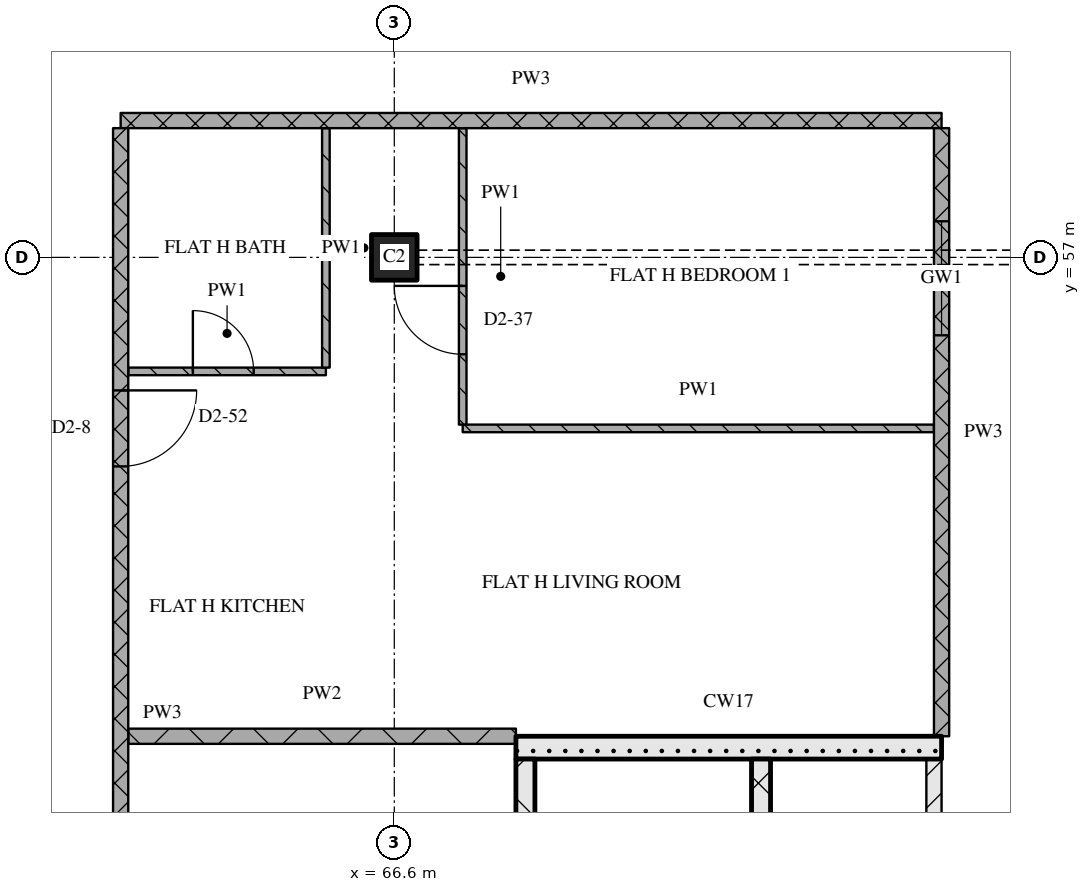
"""IFC4 building model, lengths in metres.
Left out: names, types, materials, properties, quantities, classifications, styles, units other than length and angle.
Written with IfcOpenShell. Run it as: python <this file> out.ifc"""

import sys

from ifc_helpers import new_model, si_unit, direction, frame, frame_2d, origin, origin_2d, place, context, subcontext, project, spatial, rectangle, extrude, element, fill, save


model = new_model("IFC4")
c1 = context("Model", 3, precision=1e-05, world=origin(), true_north=direction((0.0, 1.0)))
c2 = subcontext(c1, "Body", "Model", "MODEL_VIEW")
j1 = project(units=[si_unit("LENGTHUNIT", "METRE"), si_unit("PLANEANGLEUNIT", "RADIAN")], contexts=[c1])
p1 = place(None, origin())
s1 = spatial("IfcSite", under=j1, at=p1, CompositionType="ELEMENT")
p2 = place(p1, origin())
s2 = spatial("IfcBuilding", under=s1, at=p2, CompositionType="ELEMENT")
p3 = place(p2, frame((0.0, 0.0, 216.3)))
s3 = spatial("IfcBuildingStorey", under=s2, at=p3, CompositionType="ELEMENT", Elevation=216.3)
p4 = place(p3, frame((66.6, 57.0, 0.0), z_axis=(0.0, 0.0, 1.0), x_axis=(1.0, 0.0, 0.0)))
e1 = element("IfcColumn", 1, at=p4, inside=s3, PredefinedType="COLUMN", context=c2, shape_type="SweptSolid", body=[
    extrude(rectangle(XDim=0.6, YDim=0.6, at=origin_2d()), origin(), (0.0, 0.0, 1.0), 3.6),
])
p5 = place(p3, frame((68.325, 43.5, 0.0), z_axis=(0.0, 0.0, 1.0), x_axis=(0.0, 1.0, 0.0)))
e2 = element("IfcWall", 2, at=p5, inside=s3, PredefinedType="SOLIDWALL", context=c2, shape_type="SweptSolid", body=[
    extrude(rectangle(XDim=6.9, YDim=0.25, at=frame_2d((3.45, 0.0))), origin(), (0.0, 0.0, 1.0), 3.32),
])
p6 = place(p3, frame((71.425, 43.5, 0.0), z_axis=(0.0, 0.0, 1.0), x_axis=(0.0, 1.0, 0.0)))
e3 = element("IfcWall", 3, at=p6, inside=s3, PredefinedType="SOLIDWALL", context=c2, shape_type="SweptSolid", body=[
    extrude(rectangle(XDim=6.9, YDim=0.25, at=frame_2d((3.45, 0.0))), origin(), (0.0, 0.0, 1.0), 3.32),
])
p7 = place(p6, frame((0.2, 0.0, 0.0)))
e4 = element("IfcOpeningElement", 4, at=p7, cuts=e3, PredefinedType="OPENING", context=c2, shape_type="SweptSolid", body=[
    extrude(rectangle(XDim=1.0, YDim=2.1, at=frame_2d((0.5, 1.05))), frame((0.0, 0.135, 0.0), z_axis=(0.0, -1.0, 0.0), x_axis=(1.0, 0.0, 0.0)), (0.0, 0.0, 1.0), 0.27),
])
p8 = place(p3, frame((73.7, 43.5, 0.0), z_axis=(0.0, 0.0, 1.0), x_axis=(0.0, 1.0, 0.0)))
e5 = element("IfcWall", 5, at=p8, inside=s3, PredefinedType="PARTITIONING", context=c2, shape_type="SweptSolid", body=[
    extrude(rectangle(XDim=6.9, YDim=0.2, at=frame_2d((3.45, 0.0))), origin(), (0.0, 0.0, 1.0), 3.32),
])
p9 = place(p8, frame((1.0, 0.0, 0.0)))
e6 = element("IfcOpeningElement", 6, at=p9, cuts=e5, PredefinedType="OPENING", context=c2, shape_type="SweptSolid", body=[
    extrude(rectangle(XDim=1.0, YDim=2.1, at=frame_2d((0.5, 1.05))), frame((0.0, 0.11, 0.0), z_axis=(0.0, -1.0, 0.0), x_axis=(1.0, 0.0, 0.0)), (0.0, 0.0, 1.0), 0.22),
])
p10 = place(p3, frame((68.2, 50.55, 0.0), z_axis=(0.0, 0.0, 1.0), x_axis=(1.0, 0.0, 0.0)))
e7 = element("IfcWall", 7, at=p10, inside=s3, PredefinedType="SOLIDWALL", context=c2, shape_type="SweptSolid", body=[
    extrude(rectangle(XDim=5.6, YDim=0.3, at=frame_2d((2.8, 0.0))), origin(), (0.0, 0.0, 1.0), 3.32),
])
p11 = place(p3, frame((63.1, 50.7, 0.0), z_axis=(0.0, 0.0, 1.0), x_axis=(1.0, 0.0, 0.0)))
e8 = element("IfcWall", 8, at=p11, inside=s3, PredefinedType="PARTITIONING", context=c2, shape_type="SweptSolid", body=[
    extrude(rectangle(XDim=5.1, YDim=0.2, at=frame_2d((2.55, 0.0))), origin(), (0.0, 0.0, 1.0), 3.32),
])
p12 = place(p3, frame((67.5, 54.75, 0.0), z_axis=(0.0, 0.0, 1.0), x_axis=(1.0, 0.0, 0.0)))
e9 = element("IfcWall", 9, at=p12, inside=s3, PredefinedType="PARTITIONING", context=c2, shape_type="SweptSolid", body=[
    extrude(rectangle(XDim=6.2, YDim=0.1, at=frame_2d((3.1, 0.0))), origin(), (0.0, 0.0, 1.0), 3.32),
])
p13 = place(p3, frame((63.1, 55.5, 0.0), z_axis=(0.0, 0.0, 1.0), x_axis=(1.0, 0.0, 0.0)))
e10 = element("IfcWall", 10, at=p13, inside=s3, PredefinedType="PARTITIONING", context=c2, shape_type="SweptSolid", body=[
    extrude(rectangle(XDim=2.6, YDim=0.1, at=frame_2d((1.3, 0.0))), origin(), (0.0, 0.0, 1.0), 3.32),
])
p14 = place(p13, frame((0.85, 0.0, 0.0)))
e11 = element("IfcOpeningElement", 11, at=p14, cuts=e10, PredefinedType="OPENING", context=c2, shape_type="SweptSolid", body=[
    extrude(rectangle(XDim=0.8, YDim=2.1, at=frame_2d((0.4, 1.05))), frame((0.0, 0.06, 0.0), z_axis=(0.0, -1.0, 0.0), x_axis=(1.0, 0.0, 0.0)), (0.0, 0.0, 1.0), 0.12),
])
p15 = place(p3, frame((63.0, 58.8, 0.0), z_axis=(0.0, 0.0, 1.0), x_axis=(1.0, 0.0, 0.0)))
e12 = element("IfcWall", 12, at=p15, inside=s3, PredefinedType="PARTITIONING", context=c2, shape_type="SweptSolid", body=[
    extrude(rectangle(XDim=10.8, YDim=0.2, at=frame_2d((5.4, 0.0))), origin(), (0.0, 0.0, 1.0), 3.32),
])
p16 = place(p3, frame((63.0, 58.7, 0.0), z_axis=(0.0, 0.0, 1.0), x_axis=(0.0, -1.0, 0.0)))
e13 = element("IfcWall", 13, at=p16, inside=s3, PredefinedType="PARTITIONING", context=c2, shape_type="SweptSolid", body=[
    extrude(rectangle(XDim=15.4, YDim=0.2, at=frame_2d((7.7, 0.0))), origin(), (0.0, 0.0, 1.0), 3.32),
])
p17 = place(p16, frame((3.45, 0.0, 0.0)))
e14 = element("IfcOpeningElement", 14, at=p17, cuts=e13, PredefinedType="OPENING", context=c2, shape_type="SweptSolid", body=[
    extrude(rectangle(XDim=1.0, YDim=2.1, at=frame_2d((0.5, 1.05))), frame((0.0, 0.11, 0.0), z_axis=(0.0, -1.0, 0.0), x_axis=(1.0, 0.0, 0.0)), (0.0, 0.0, 1.0), 0.22),
])
p18 = place(p16, frame((11.25, 0.0, 0.0)))
e15 = element("IfcOpeningElement", 15, at=p18, cuts=e13, PredefinedType="OPENING", context=c2, shape_type="SweptSolid", body=[
    extrude(rectangle(XDim=0.9, YDim=2.1, at=frame_2d((0.45, 1.05))), frame((0.0, 0.11, 0.0), z_axis=(0.0, -1.0, 0.0), x_axis=(1.0, 0.0, 0.0)), (0.0, 0.0, 1.0), 0.22),
])
p19 = place(p3, frame((65.7, 58.7, 0.0), z_axis=(0.0, 0.0, 1.0), x_axis=(0.0, -1.0, 0.0)))
e16 = element("IfcWall", 16, at=p19, inside=s3, PredefinedType="PARTITIONING", context=c2, shape_type="SweptSolid", body=[
    extrude(rectangle(XDim=3.15, YDim=0.1, at=frame_2d((1.575, 0.0))), origin(), (0.0, 0.0, 1.0), 3.32),
])
p20 = place(p3, frame((67.5, 58.7, 0.0), z_axis=(0.0, 0.0, 1.0), x_axis=(0.0, -1.0, 0.0)))
e17 = element("IfcWall", 17, at=p20, inside=s3, PredefinedType="PARTITIONING", context=c2, shape_type="SweptSolid", body=[
    extrude(rectangle(XDim=3.9, YDim=0.1, at=frame_2d((1.95, 0.0))), origin(), (0.0, 0.0, 1.0), 3.32),
])
p21 = place(p20, frame((2.075, 0.0, 0.0)))
e18 = element("IfcOpeningElement", 18, at=p21, cuts=e17, PredefinedType="OPENING", context=c2, shape_type="SweptSolid", body=[
    extrude(rectangle(XDim=0.9, YDim=2.1, at=frame_2d((0.45, 1.05))), frame((0.0, 0.06, 0.0), z_axis=(0.0, -1.0, 0.0), x_axis=(1.0, 0.0, 0.0)), (0.0, 0.0, 1.0), 0.12),
])
p22 = place(p3, frame((73.8, 58.7, 0.0), z_axis=(0.0, 0.0, 1.0), x_axis=(0.0, -1.0, 0.0)))
e19 = element("IfcWall", 19, at=p22, inside=s3, PredefinedType="PARTITIONING", context=c2, shape_type="SweptSolid", body=[
    extrude(rectangle(XDim=8.0, YDim=0.2, at=frame_2d((4.0, 0.0))), origin(), (0.0, 0.0, 1.0), 3.32),
])
p23 = place(p22, frame((1.225, 0.0, 0.9)))
e20 = element("IfcOpeningElement", 20, at=p23, cuts=e19, PredefinedType="OPENING", context=c2, shape_type="SweptSolid", body=[
    extrude(rectangle(XDim=1.5, YDim=1.5, at=frame_2d((0.75, 0.75))), frame((0.0, 0.11, 0.0), z_axis=(0.0, -1.0, 0.0), x_axis=(1.0, 0.0, 0.0)), (0.0, 0.0, 1.0), 0.22),
])
p24 = place(p14, origin())
e21 = element("IfcDoor", 21, at=p24, inside=s3, OperationType="SINGLE_SWING_LEFT", PredefinedType="DOOR", context=c2, shape_type="SweptSolid", body=[
    extrude(rectangle(XDim=0.8, YDim=2.1, at=frame_2d((0.4, 1.05))), frame((0.0, 0.025, 0.0), z_axis=(0.0, -1.0, 0.0), x_axis=(1.0, 0.0, 0.0)), (0.0, 0.0, 1.0), 0.05),
])
fill(e11, e21)
p25 = place(p17, origin())
e22 = element("IfcDoor", 22, at=p25, inside=s3, OperationType="SINGLE_SWING_LEFT", PredefinedType="DOOR", context=c2, shape_type="SweptSolid", body=[
    extrude(rectangle(XDim=1.0, YDim=2.1, at=frame_2d((0.5, 1.05))), frame((0.0, 0.025, 0.0), z_axis=(0.0, -1.0, 0.0), x_axis=(1.0, 0.0, 0.0)), (0.0, 0.0, 1.0), 0.05),
])
fill(e14, e22)
p26 = place(p21, origin())
e23 = element("IfcDoor", 23, at=p26, inside=s3, OperationType="SINGLE_SWING_RIGHT", PredefinedType="DOOR", context=c2, shape_type="SweptSolid", body=[
    extrude(rectangle(XDim=0.9, YDim=2.1, at=frame_2d((0.45, 1.05))), frame((0.0, 0.025, 0.0), z_axis=(0.0, -1.0, 0.0), x_axis=(1.0, 0.0, 0.0)), (0.0, 0.0, 1.0), 0.05),
])
fill(e18, e23)
p27 = place(p23, origin())
e24 = element("IfcWindow", 24, at=p27, inside=s3, PartitioningType="SINGLE_PANEL", PredefinedType="WINDOW", context=c2, shape_type="SweptSolid", body=[
    extrude(rectangle(XDim=1.5, YDim=1.5, at=frame_2d((0.75, 0.75))), frame((0.0, 0.03, 0.0), z_axis=(0.0, -1.0, 0.0), x_axis=(1.0, 0.0, 0.0)), (0.0, 0.0, 1.0), 0.06),
])
fill(e20, e24)
save(model, sys.argv[1])
